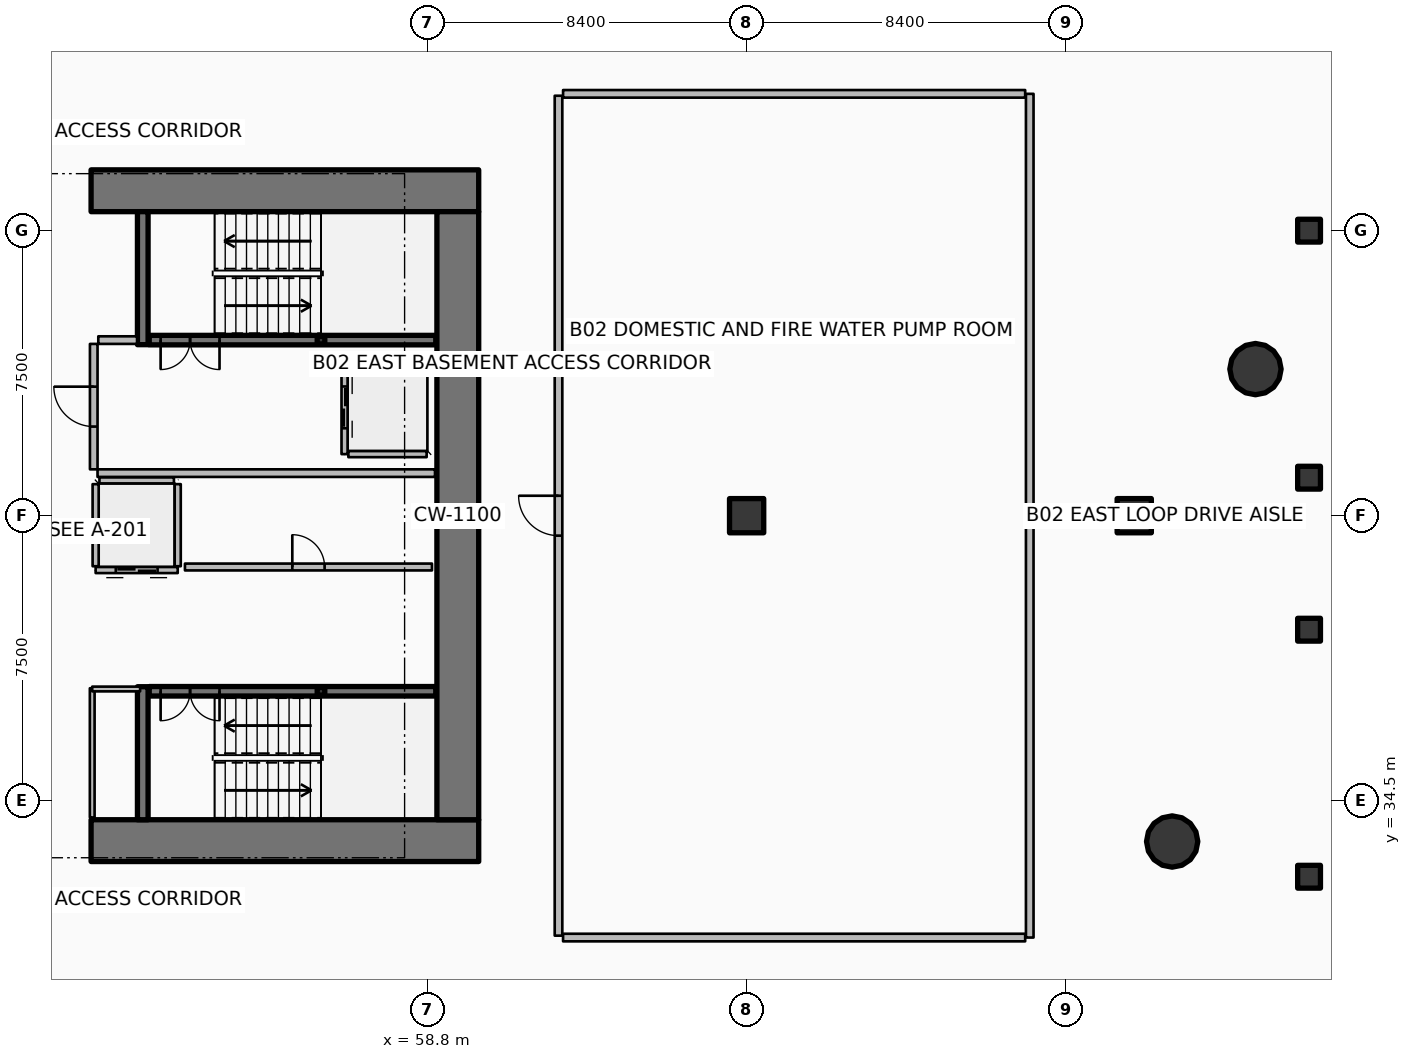
"""IFC4 building model, lengths in metres.
Left out: names, types, materials, properties, quantities, classifications, styles, units other than length and angle.
Written with IfcOpenShell. Run it as: python <this file> out.ifc"""

import sys

from ifc_helpers import new_model, si_unit, direction, frame, frame_2d, origin, origin_2d, place, context, subcontext, project, spatial, rectangle, hollow_rectangle, circle, extrude, element, fill, save


model = new_model("IFC4")
c1 = context("Model", 3, precision=1e-05, world=origin(), true_north=direction((0.0, 1.0)))
c2 = subcontext(c1, "Body", "Model", "MODEL_VIEW")
j1 = project(units=[si_unit("LENGTHUNIT", "METRE"), si_unit("PLANEANGLEUNIT", "RADIAN")], contexts=[c1])
p1 = place(None, origin())
s1 = spatial("IfcSite", under=j1, at=p1, CompositionType="ELEMENT")
p2 = place(p1, origin())
s2 = spatial("IfcBuilding", under=s1, at=p2, CompositionType="ELEMENT")
p3 = place(p2, frame((0.0, 0.0, -7.6)))
s3 = spatial("IfcBuildingStorey", under=s2, at=p3, CompositionType="ELEMENT", Elevation=-7.6)
for number, where, z_axis, x_axis in (
    (1, (67.2, 42.0, 0.0), (0.0, 0.0, 1.0), (1.0, 0.0, 0.0)),
    (2, (77.4, 42.0, 0.0), (0.0, 0.0, 1.0), (1.0, 0.0, 0.0)),
):
    element("IfcColumn", number, at=place(p3, frame(where, z_axis=z_axis, x_axis=x_axis)), inside=s3, PredefinedType="COLUMN", context=c2, shape_type="SweptSolid", body=[
        extrude(rectangle(XDim=0.9, YDim=0.9, at=origin_2d()), origin(), (0.0, 0.0, 1.0), 3.52),
    ])
for number, where, z_axis, x_axis in (
    (3, (82.0, 32.5, 0.0), (0.0, 0.0, 1.0), (1.0, 0.0, 0.0)),
    (4, (82.0, 39.0, 0.0), (0.0, 0.0, 1.0), (1.0, 0.0, 0.0)),
    (5, (82.0, 43.0, 0.0), (0.0, 0.0, 1.0), (1.0, 0.0, 0.0)),
    (6, (82.0, 49.5, 0.0), (0.0, 0.0, 1.0), (1.0, 0.0, 0.0)),
):
    element("IfcColumn", number, at=place(p3, frame(where, z_axis=z_axis, x_axis=x_axis)), inside=s3, PredefinedType="COLUMN", context=c2, shape_type="SweptSolid", body=[
        extrude(rectangle(XDim=0.6, YDim=0.6, at=origin_2d()), origin(), (0.0, 0.0, 1.0), 3.52),
    ])
for number, where, z_axis, x_axis in (
    (7, (49.95, 33.45, 0.0), (0.0, 0.0, 1.0), (1.0, 0.0, 0.0)),
    (8, (49.95, 50.55, 0.0), (0.0, 0.0, 1.0), (1.0, 0.0, 0.0)),
):
    element("IfcWall", number, at=place(p3, frame(where, z_axis=z_axis, x_axis=x_axis)), inside=s3, PredefinedType="SHEAR", context=c2, shape_type="SweptSolid", body=[
        extrude(rectangle(XDim=10.2, YDim=1.1, at=frame_2d((5.1, 0.0))), origin(), (0.0, 0.0, 1.0), 3.8),
    ])
p4 = place(p3, frame((59.6, 34.0, 0.0), z_axis=(0.0, 0.0, 1.0), x_axis=(0.0, 1.0, 0.0)))
e9 = element("IfcWall", 9, at=p4, inside=s3, PredefinedType="SHEAR", context=c2, shape_type="SweptSolid", body=[
    extrude(rectangle(XDim=16.0, YDim=1.1, at=frame_2d((8.0, 0.0))), origin(), (0.0, 0.0, 1.0), 3.8),
])
for number, where, z_axis, x_axis in (
    (10, (51.31, 46.5, 0.0), (0.0, 0.0, 1.0), (0.0, 1.0, 0.0)),
    (11, (51.31, 34.0, 0.0), (0.0, 0.0, 1.0), (0.0, 1.0, 0.0)),
):
    element("IfcWall", number, at=place(p3, frame(where, z_axis=z_axis, x_axis=x_axis)), inside=s3, PredefinedType="SHEAR", context=c2, shape_type="SweptSolid", body=[
        extrude(rectangle(XDim=3.5, YDim=0.28, at=frame_2d((1.75, 0.0))), origin(), (0.0, 0.0, 1.0), 3.8),
    ])
for number, where, z_axis, x_axis in (
    (12, (56.0, 46.62, 0.0), (0.0, 0.0, 1.0), (1.0, 0.0, 0.0)),
    (13, (56.0, 37.38, 0.0), (0.0, 0.0, 1.0), (1.0, 0.0, 0.0)),
):
    element("IfcColumn", number, at=place(p3, frame(where, z_axis=z_axis, x_axis=x_axis)), inside=s3, PredefinedType="COLUMN", context=c2, shape_type="SweptSolid", body=[
        extrude(hollow_rectangle(XDim=0.2, YDim=0.2, WallThickness=0.01, InnerFilletRadius=0.01, OuterFilletRadius=0.02, at=origin_2d()), origin(), (0.0, 0.0, 1.0), 1.695),
    ])
for number, where, z_axis, x_axis in (
    (14, (78.398, 33.427, 0.0), (0.0, 0.0, 1.0), (1.0, 0.0, 0.0)),
    (15, (80.59, 45.857, 0.0), (0.0, 0.0, 1.0), (1.0, 0.0, 0.0)),
):
    element("IfcColumn", number, at=place(p3, frame(where, z_axis=z_axis, x_axis=x_axis)), inside=s3, PredefinedType="COLUMN", context=c2, shape_type="SweptSolid", body=[
        extrude(circle(Radius=0.675, at=origin_2d()), origin(), (0.0, 0.0, 1.0), 3.52),
    ])
p5 = place(p3, frame((51.48, 46.62, 0.0), z_axis=(0.0, 0.0, 1.0), x_axis=(1.0, 0.0, 0.0)))
e16 = element("IfcWall", 16, at=p5, inside=s3, PredefinedType="SOLIDWALL", context=c2, shape_type="SweptSolid", body=[
    extrude(rectangle(XDim=7.54, YDim=0.25, at=frame_2d((3.77, 0.0))), origin(), (0.0, 0.0, 1.0), 3.52),
])
p6 = place(p5, frame((0.3, 0.0, 0.0)))
e17 = element("IfcOpeningElement", 17, at=p6, cuts=e16, PredefinedType="OPENING", context=c2, shape_type="SweptSolid", body=[
    extrude(rectangle(XDim=1.55, YDim=2.15, at=frame_2d((0.775, 1.075))), frame((0.0, 0.135, 0.0), z_axis=(0.0, -1.0, 0.0), x_axis=(1.0, 0.0, 0.0)), (0.0, 0.0, 1.0), 0.27),
])
p7 = place(p3, frame((51.48, 37.38, 0.0), z_axis=(0.0, 0.0, 1.0), x_axis=(1.0, 0.0, 0.0)))
e18 = element("IfcWall", 18, at=p7, inside=s3, PredefinedType="SOLIDWALL", context=c2, shape_type="SweptSolid", body=[
    extrude(rectangle(XDim=7.54, YDim=0.25, at=frame_2d((3.77, 0.0))), origin(), (0.0, 0.0, 1.0), 3.52),
])
p8 = place(p7, frame((0.3, 0.0, 0.0)))
e19 = element("IfcOpeningElement", 19, at=p8, cuts=e18, PredefinedType="OPENING", context=c2, shape_type="SweptSolid", body=[
    extrude(rectangle(XDim=1.55, YDim=2.15, at=frame_2d((0.775, 1.075))), frame((0.0, 0.135, 0.0), z_axis=(0.0, -1.0, 0.0), x_axis=(1.0, 0.0, 0.0)), (0.0, 0.0, 1.0), 0.27),
])
p9 = place(p3, frame((56.62, 46.08, 0.0), z_axis=(0.0, 0.0, 1.0), x_axis=(0.0, -1.0, 0.0)))
e20 = element("IfcWall", 20, at=p9, inside=s3, PredefinedType="PARTITIONING", context=c2, shape_type="SweptSolid", body=[
    extrude(rectangle(XDim=2.46, YDim=0.16, at=frame_2d((1.23, 0.0))), origin(), (0.0, 0.0, 1.0), 3.52),
])
p10 = place(p9, frame((0.68, 0.0, 0.0)))
e21 = element("IfcOpeningElement", 21, at=p10, cuts=e20, PredefinedType="OPENING", context=c2, shape_type="SweptSolid", body=[
    extrude(rectangle(XDim=1.1, YDim=2.1, at=frame_2d((0.55, 1.05))), frame((0.0, 0.09, 0.0), z_axis=(0.0, -1.0, 0.0), x_axis=(1.0, 0.0, 0.0)), (0.0, 0.0, 1.0), 0.18),
])
for number, where, z_axis, x_axis in (
    (22, (56.72, 46.08, 0.0), (0.0, 0.0, 1.0), (1.0, 0.0, 0.0)),
    (23, (56.72, 43.62, 0.0), (0.0, 0.0, 1.0), (1.0, 0.0, 0.0)),
):
    element("IfcWall", number, at=place(p3, frame(where, z_axis=z_axis, x_axis=x_axis)), inside=s3, PredefinedType="PARTITIONING", context=c2, shape_type="SweptSolid", body=[
        extrude(rectangle(XDim=2.06, YDim=0.16, at=frame_2d((1.03, 0.0))), origin(), (0.0, 0.0, 1.0), 3.52),
    ])
p11 = place(p3, frame((52.23, 40.57, 0.0), z_axis=(0.0, 0.0, 1.0), x_axis=(-1.0, 0.0, 0.0)))
e24 = element("IfcWall", 24, at=p11, inside=s3, PredefinedType="PARTITIONING", context=c2, shape_type="SweptSolid", body=[
    extrude(rectangle(XDim=2.16, YDim=0.16, at=frame_2d((1.08, 0.0))), origin(), (0.0, 0.0, 1.0), 3.52),
])
p12 = place(p11, frame((0.53, 0.0, 0.0)))
e25 = element("IfcOpeningElement", 25, at=p12, cuts=e24, PredefinedType="OPENING", context=c2, shape_type="SweptSolid", body=[
    extrude(rectangle(XDim=1.1, YDim=2.1, at=frame_2d((0.55, 1.05))), frame((0.0, 0.09, 0.0), z_axis=(0.0, -1.0, 0.0), x_axis=(1.0, 0.0, 0.0)), (0.0, 0.0, 1.0), 0.18),
])
for number, where, z_axis, x_axis in (
    (26, (52.23, 40.67, 0.0), (0.0, 0.0, 1.0), (0.0, 1.0, 0.0)),
    (27, (50.07, 40.67, 0.0), (0.0, 0.0, 1.0), (0.0, 1.0, 0.0)),
):
    element("IfcWall", number, at=place(p3, frame(where, z_axis=z_axis, x_axis=x_axis)), inside=s3, PredefinedType="PARTITIONING", context=c2, shape_type="SweptSolid", body=[
        extrude(rectangle(XDim=2.16, YDim=0.16, at=frame_2d((1.08, 0.0))), origin(), (0.0, 0.0, 1.0), 3.52),
    ])
p13 = place(p3, frame((50.17, 42.93, 0.0), z_axis=(0.0, 0.0, 1.0), x_axis=(1.0, 0.0, 0.0)))
e28 = element("IfcWall", 28, at=p13, inside=s3, PredefinedType="PARTITIONING", context=c2, shape_type="SweptSolid", body=[
    extrude(rectangle(XDim=1.96, YDim=0.16, at=frame_2d((0.98, 0.0))), origin(), (0.0, 0.0, 1.0), 3.52),
])
p14 = place(p3, frame((52.42, 40.65, 0.0), z_axis=(0.0, 0.0, 1.0), x_axis=(1.0, 0.0, 0.0)))
e29 = element("IfcWall", 29, at=p14, inside=s3, PredefinedType="PARTITIONING", context=c2, shape_type="SweptSolid", body=[
    extrude(rectangle(XDim=6.5, YDim=0.18, at=frame_2d((3.25, 0.0))), origin(), (0.0, 0.0, 1.0), 3.52),
])
p15 = place(p14, frame((2.825, 0.0, 0.0)))
e30 = element("IfcOpeningElement", 30, at=p15, cuts=e29, PredefinedType="OPENING", context=c2, shape_type="SweptSolid", body=[
    extrude(rectangle(XDim=0.85, YDim=2.06, at=frame_2d((0.425, 1.03))), frame((0.0, 0.1, 0.0), z_axis=(0.0, -1.0, 0.0), x_axis=(1.0, 0.0, 0.0)), (0.0, 0.0, 1.0), 0.2),
])
p16 = place(p3, frame((50.12, 43.12, 0.0), z_axis=(0.0, 0.0, 1.0), x_axis=(1.0, 0.0, 0.0)))
e31 = element("IfcWall", 31, at=p16, inside=s3, PredefinedType="PARTITIONING", context=c2, shape_type="SweptSolid", body=[
    extrude(rectangle(XDim=8.88, YDim=0.2, at=frame_2d((4.44, 0.0))), origin(), (0.0, 0.0, 1.0), 3.52),
])
p17 = place(p3, frame((50.14, 46.62, 0.0), z_axis=(0.0, 0.0, 1.0), x_axis=(1.0, 0.0, 0.0)))
e32 = element("IfcWall", 32, at=p17, inside=s3, PredefinedType="PARTITIONING", context=c2, shape_type="SweptSolid", body=[
    extrude(rectangle(XDim=1.02, YDim=0.2, at=frame_2d((0.51, 0.0))), origin(), (0.0, 0.0, 1.0), 3.52),
])
p18 = place(p3, frame((50.02, 43.22, 0.0), z_axis=(0.0, 0.0, 1.0), x_axis=(0.0, 1.0, 0.0)))
e33 = element("IfcWall", 33, at=p18, inside=s3, PredefinedType="PARTITIONING", context=c2, shape_type="SweptSolid", body=[
    extrude(rectangle(XDim=3.3, YDim=0.2, at=frame_2d((1.65, 0.0))), origin(), (0.0, 0.0, 1.0), 3.52),
])
p19 = place(p18, frame((1.125, 0.0, 0.0)))
e34 = element("IfcOpeningElement", 34, at=p19, cuts=e33, PredefinedType="OPENING", context=c2, shape_type="SweptSolid", body=[
    extrude(rectangle(XDim=1.05, YDim=2.1, at=frame_2d((0.525, 1.05))), frame((0.0, 0.11, 0.0), z_axis=(0.0, -1.0, 0.0), x_axis=(1.0, 0.0, 0.0)), (0.0, 0.0, 1.0), 0.22),
])
p20 = place(p3, frame((49.98, 34.06, 0.0), z_axis=(0.0, 0.0, 1.0), x_axis=(0.0, 1.0, 0.0)))
e35 = element("IfcWall", 35, at=p20, inside=s3, PredefinedType="PARTITIONING", context=c2, shape_type="SweptSolid", body=[
    extrude(rectangle(XDim=3.4, YDim=0.125, at=frame_2d((1.7, 0.0))), origin(), (0.0, 0.0, 1.0), 2.96),
])
p21 = place(p3, frame((49.98, 37.44, 0.0), z_axis=(0.0, 0.0, 1.0), x_axis=(1.0, 0.0, 0.0)))
e36 = element("IfcWall", 36, at=p21, inside=s3, PredefinedType="PARTITIONING", context=c2, shape_type="SweptSolid", body=[
    extrude(rectangle(XDim=1.26, YDim=0.125, at=frame_2d((0.63, 0.0))), origin(), (0.0, 0.0, 1.0), 2.96),
])
p22 = place(p3, frame((74.65, 30.9, 0.0), z_axis=(0.0, 0.0, 1.0), x_axis=(0.0, 1.0, 0.0)))
e37 = element("IfcWall", 37, at=p22, inside=s3, PredefinedType="PARTITIONING", context=c2, shape_type="SweptSolid", body=[
    extrude(rectangle(XDim=22.2, YDim=0.2, at=frame_2d((11.1, 0.0))), origin(), (0.0, 0.0, 1.0), 2.811),
])
for number, where, z_axis, x_axis in (
    (38, (62.37, 53.1, 0.0), (0.0, 0.0, 1.0), (1.0, 0.0, 0.0)),
    (39, (62.37, 30.9, 0.0), (0.0, 0.0, 1.0), (1.0, 0.0, 0.0)),
):
    element("IfcWall", number, at=place(p3, frame(where, z_axis=z_axis, x_axis=x_axis)), inside=s3, PredefinedType="PARTITIONING", context=c2, shape_type="SweptSolid", body=[
        extrude(rectangle(XDim=12.16, YDim=0.2, at=frame_2d((6.08, 0.0))), origin(), (0.0, 0.0, 1.0), 2.811),
    ])
p23 = place(p3, frame((62.25, 30.95, 0.0), z_axis=(0.0, 0.0, 1.0), x_axis=(0.0, 1.0, 0.0)))
e40 = element("IfcWall", 40, at=p23, inside=s3, PredefinedType="PARTITIONING", context=c2, shape_type="SweptSolid", body=[
    extrude(rectangle(XDim=22.1, YDim=0.2, at=frame_2d((11.05, 0.0))), origin(), (0.0, 0.0, 1.0), 2.811),
])
p24 = place(p23, frame((10.525, 0.0, 0.0)))
e41 = element("IfcOpeningElement", 41, at=p24, cuts=e40, PredefinedType="OPENING", context=c2, shape_type="SweptSolid", body=[
    extrude(rectangle(XDim=1.05, YDim=2.1, at=frame_2d((0.525, 1.05))), frame((0.0, 0.11, 0.0), z_axis=(0.0, -1.0, 0.0), x_axis=(1.0, 0.0, 0.0)), (0.0, 0.0, 1.0), 0.22),
])
p25 = place(p6, origin())
e42 = element("IfcDoor", 42, at=p25, inside=s3, OperationType="DOUBLE_DOOR_SINGLE_SWING", PredefinedType="DOOR", context=c2, shape_type="SweptSolid", body=[
    extrude(rectangle(XDim=1.55, YDim=2.15, at=frame_2d((0.775, 1.075))), frame((0.0, 0.025, 0.0), z_axis=(0.0, -1.0, 0.0), x_axis=(1.0, 0.0, 0.0)), (0.0, 0.0, 1.0), 0.05),
])
fill(e17, e42)
p26 = place(p8, origin())
e43 = element("IfcDoor", 43, at=p26, inside=s3, OperationType="DOUBLE_DOOR_SINGLE_SWING", PredefinedType="DOOR", context=c2, shape_type="SweptSolid", body=[
    extrude(rectangle(XDim=1.55, YDim=2.15, at=frame_2d((0.775, 1.075))), frame((0.0, 0.025, 0.0), z_axis=(0.0, -1.0, 0.0), x_axis=(1.0, 0.0, 0.0)), (0.0, 0.0, 1.0), 0.05),
])
fill(e19, e43)
p27 = place(p10, origin())
e44 = element("IfcDoor", 44, at=p27, inside=s3, OperationType="DOUBLE_DOOR_SLIDING", PredefinedType="DOOR", context=c2, shape_type="SweptSolid", body=[
    extrude(rectangle(XDim=1.1, YDim=2.1, at=frame_2d((0.55, 1.05))), frame((0.0, 0.025, 0.0), z_axis=(0.0, -1.0, 0.0), x_axis=(1.0, 0.0, 0.0)), (0.0, 0.0, 1.0), 0.05),
])
fill(e21, e44)
p28 = place(p12, origin())
e45 = element("IfcDoor", 45, at=p28, inside=s3, OperationType="DOUBLE_DOOR_SLIDING", PredefinedType="DOOR", context=c2, shape_type="SweptSolid", body=[
    extrude(rectangle(XDim=1.1, YDim=2.1, at=frame_2d((0.55, 1.05))), frame((0.0, 0.025, 0.0), z_axis=(0.0, -1.0, 0.0), x_axis=(1.0, 0.0, 0.0)), (0.0, 0.0, 1.0), 0.05),
])
fill(e25, e45)
p29 = place(p15, origin())
e46 = element("IfcDoor", 46, at=p29, inside=s3, OperationType="SINGLE_SWING_LEFT", PredefinedType="DOOR", context=c2, shape_type="SweptSolid", body=[
    extrude(rectangle(XDim=0.85, YDim=2.06, at=frame_2d((0.425, 1.03))), frame((0.0, 0.025, 0.0), z_axis=(0.0, -1.0, 0.0), x_axis=(1.0, 0.0, 0.0)), (0.0, 0.0, 1.0), 0.05),
])
fill(e30, e46)
p30 = place(p19, origin())
e47 = element("IfcDoor", 47, at=p30, inside=s3, OperationType="SINGLE_SWING_RIGHT", PredefinedType="DOOR", context=c2, shape_type="SweptSolid", body=[
    extrude(rectangle(XDim=1.05, YDim=2.1, at=frame_2d((0.525, 1.05))), frame((0.0, 0.025, 0.0), z_axis=(0.0, -1.0, 0.0), x_axis=(1.0, 0.0, 0.0)), (0.0, 0.0, 1.0), 0.05),
])
fill(e34, e47)
p31 = place(p24, origin())
e48 = element("IfcDoor", 48, at=p31, inside=s3, OperationType="SINGLE_SWING_RIGHT", PredefinedType="DOOR", context=c2, shape_type="SweptSolid", body=[
    extrude(rectangle(XDim=1.05, YDim=2.1, at=frame_2d((0.525, 1.05))), frame((0.0, 0.025, 0.0), z_axis=(0.0, -1.0, 0.0), x_axis=(1.0, 0.0, 0.0)), (0.0, 0.0, 1.0), 0.05),
])
fill(e41, e48)
save(model, sys.argv[1])
